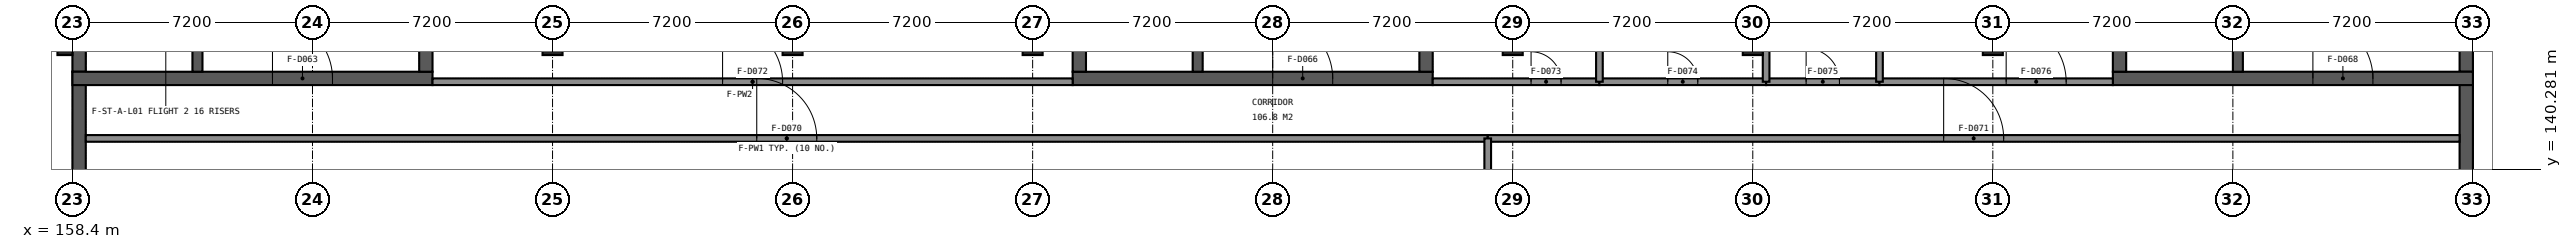
"""IFC4 building model, lengths in metres.
Left out: names, types, materials, properties, quantities, classifications, styles, units other than length and angle.
Written with IfcOpenShell. Run it as: python <this file> out.ifc"""

import sys

from ifc_helpers import new_model, si_unit, direction, frame, frame_2d, origin, origin_2d, place, context, subcontext, project, spatial, rectangle, extrude, element, fill, save


model = new_model("IFC4")
c1 = context("Model", 3, precision=1e-05, world=origin(), true_north=direction((0.0, 1.0)))
c2 = subcontext(c1, "Body", "Model", "MODEL_VIEW")
j1 = project(units=[si_unit("LENGTHUNIT", "METRE"), si_unit("PLANEANGLEUNIT", "RADIAN")], contexts=[c1])
p1 = place(None, origin())
s1 = spatial("IfcSite", under=j1, at=p1, CompositionType="ELEMENT")
p2 = place(p1, origin())
s2 = spatial("IfcBuilding", under=s1, at=p2, CompositionType="ELEMENT")
p3 = place(p2, frame((0.0, 0.0, 9.6)))
s3 = spatial("IfcBuildingStorey", under=s2, at=p3, CompositionType="ELEMENT", Elevation=9.6)
for number, where, z_axis, x_axis in (
    (1, (172.8, 144.0, 0.0), (0.0, 0.0, 1.0), (1.0, 0.0, 0.0)),
    (2, (180.0, 144.0, 0.0), (0.0, 0.0, 1.0), (1.0, 0.0, 0.0)),
    (3, (187.2, 144.0, 0.0), (0.0, 0.0, 1.0), (1.0, 0.0, 0.0)),
    (4, (201.6, 144.0, 0.0), (0.0, 0.0, 1.0), (1.0, 0.0, 0.0)),
    (5, (208.8, 144.0, 0.0), (0.0, 0.0, 1.0), (1.0, 0.0, 0.0)),
    (6, (216.0, 144.0, 0.0), (0.0, 0.0, 1.0), (1.0, 0.0, 0.0)),
):
    element("IfcColumn", number, at=place(p3, frame(where, z_axis=z_axis, x_axis=x_axis)), inside=s3, PredefinedType="COLUMN", context=c2, shape_type="SweptSolid", body=[
        extrude(rectangle(XDim=0.6, YDim=0.6, at=origin_2d()), origin(), (0.0, 0.0, 1.0), 4.8),
    ])
p4 = place(p3, frame((158.6, 137.1, 0.0), z_axis=(0.0, 0.0, 1.0), x_axis=(0.0, 1.0, 0.0)))
e7 = element("IfcWall", 7, at=p4, inside=s3, PredefinedType="SHEAR", context=c2, shape_type="SweptSolid", body=[
    extrude(rectangle(XDim=6.1, YDim=0.4, at=frame_2d((3.05, 0.0))), origin(), (0.0, 0.0, 1.0), 3.95),
])
p5 = place(p4, frame((0.85, 0.0, 0.8)))
e8 = element("IfcOpeningElement", 8, at=p5, cuts=e7, PredefinedType="OPENING", context=c2, shape_type="SweptSolid", body=[
    extrude(rectangle(XDim=1.6, YDim=3.1, at=frame_2d((0.8, 1.55))), frame((0.0, 0.21, 0.0), z_axis=(0.0, -1.0, 0.0), x_axis=(1.0, 0.0, 0.0)), (0.0, 0.0, 1.0), 0.42),
])
p6 = place(p3, frame((158.6, 143.2, 0.0), z_axis=(0.0, 0.0, 1.0), x_axis=(0.0, 1.0, 0.0)))
e9 = element("IfcWall", 9, at=p6, inside=s3, PredefinedType="SHEAR", context=c2, shape_type="SweptSolid", body=[
    extrude(rectangle(XDim=7.6, YDim=0.4, at=frame_2d((3.8, 0.0))), origin(), (0.0, 0.0, 1.0), 4.55),
])
p7 = place(p3, frame((230.2, 143.2, 0.0), z_axis=(0.0, 0.0, 1.0), x_axis=(0.0, -1.0, 0.0)))
e10 = element("IfcWall", 10, at=p7, inside=s3, PredefinedType="SHEAR", context=c2, shape_type="SweptSolid", body=[
    extrude(rectangle(XDim=6.1, YDim=0.4, at=frame_2d((3.05, 0.0))), origin(), (0.0, 0.0, 1.0), 3.95),
])
p8 = place(p7, frame((3.65, 0.0, 0.8)))
e11 = element("IfcOpeningElement", 11, at=p8, cuts=e10, PredefinedType="OPENING", context=c2, shape_type="SweptSolid", body=[
    extrude(rectangle(XDim=1.6, YDim=3.1, at=frame_2d((0.8, 1.55))), frame((0.0, 0.21, 0.0), z_axis=(0.0, -1.0, 0.0), x_axis=(1.0, 0.0, 0.0)), (0.0, 0.0, 1.0), 0.42),
])
p9 = place(p3, frame((230.2, 150.8, 0.0), z_axis=(0.0, 0.0, 1.0), x_axis=(0.0, -1.0, 0.0)))
e12 = element("IfcWall", 12, at=p9, inside=s3, PredefinedType="SHEAR", context=c2, shape_type="SweptSolid", body=[
    extrude(rectangle(XDim=7.6, YDim=0.4, at=frame_2d((3.8, 0.0))), origin(), (0.0, 0.0, 1.0), 4.55),
])
p10 = place(p3, frame((158.4, 143.0, 0.0), z_axis=(0.0, 0.0, 1.0), x_axis=(1.0, 0.0, 0.0)))
e13 = element("IfcWall", 13, at=p10, inside=s3, PredefinedType="SHEAR", context=c2, shape_type="SweptSolid", body=[
    extrude(rectangle(XDim=10.8, YDim=0.4, at=frame_2d((5.4, 0.0))), origin(), (0.0, 0.0, 1.0), 4.55),
])
p11 = place(p10, frame((6.0, 0.0, 0.0)))
e14 = element("IfcOpeningElement", 14, at=p11, cuts=e13, PredefinedType="OPENING", context=c2, shape_type="SweptSolid", body=[
    extrude(rectangle(XDim=1.8, YDim=2.1, at=frame_2d((0.9, 1.05))), frame((0.0, 0.21, 0.0), z_axis=(0.0, -1.0, 0.0), x_axis=(1.0, 0.0, 0.0)), (0.0, 0.0, 1.0), 0.42),
])
p12 = place(p3, frame((169.0, 143.2, 0.0), z_axis=(0.0, 0.0, 1.0), x_axis=(0.0, 1.0, 0.0)))
e15 = element("IfcWall", 15, at=p12, inside=s3, PredefinedType="SHEAR", context=c2, shape_type="SweptSolid", body=[
    extrude(rectangle(XDim=7.6, YDim=0.4, at=frame_2d((3.8, 0.0))), origin(), (0.0, 0.0, 1.0), 4.55),
])
p13 = place(p3, frame((162.15, 143.2, 0.0), z_axis=(0.0, 0.0, 1.0), x_axis=(0.0, 1.0, 0.0)))
e16 = element("IfcWall", 16, at=p13, inside=s3, PredefinedType="SHEAR", context=c2, shape_type="SweptSolid", body=[
    extrude(rectangle(XDim=7.6, YDim=0.3, at=frame_2d((3.8, 0.0))), origin(), (0.0, 0.0, 1.0), 4.55),
])
p14 = place(p13, frame((6.35, 0.0, 0.0)))
e17 = element("IfcOpeningElement", 17, at=p14, cuts=e16, PredefinedType="OPENING", context=c2, shape_type="SweptSolid", body=[
    extrude(rectangle(XDim=1.0, YDim=2.1, at=frame_2d((0.5, 1.05))), frame((0.0, 0.16, 0.0), z_axis=(0.0, -1.0, 0.0), x_axis=(1.0, 0.0, 0.0)), (0.0, 0.0, 1.0), 0.32),
])
p15 = place(p3, frame((188.4, 143.0, 0.0), z_axis=(0.0, 0.0, 1.0), x_axis=(1.0, 0.0, 0.0)))
e18 = element("IfcWall", 18, at=p15, inside=s3, PredefinedType="SHEAR", context=c2, shape_type="SweptSolid", body=[
    extrude(rectangle(XDim=10.8, YDim=0.4, at=frame_2d((5.4, 0.0))), origin(), (0.0, 0.0, 1.0), 4.55),
])
p16 = place(p15, frame((6.0, 0.0, 0.0)))
e19 = element("IfcOpeningElement", 19, at=p16, cuts=e18, PredefinedType="OPENING", context=c2, shape_type="SweptSolid", body=[
    extrude(rectangle(XDim=1.8, YDim=2.1, at=frame_2d((0.9, 1.05))), frame((0.0, 0.21, 0.0), z_axis=(0.0, -1.0, 0.0), x_axis=(1.0, 0.0, 0.0)), (0.0, 0.0, 1.0), 0.42),
])
for number, where, z_axis, x_axis in (
    (20, (188.6, 143.2, 0.0), (0.0, 0.0, 1.0), (0.0, 1.0, 0.0)),
    (21, (199.0, 143.2, 0.0), (0.0, 0.0, 1.0), (0.0, 1.0, 0.0)),
):
    element("IfcWall", number, at=place(p3, frame(where, z_axis=z_axis, x_axis=x_axis)), inside=s3, PredefinedType="SHEAR", context=c2, shape_type="SweptSolid", body=[
        extrude(rectangle(XDim=7.6, YDim=0.4, at=frame_2d((3.8, 0.0))), origin(), (0.0, 0.0, 1.0), 4.55),
    ])
p17 = place(p3, frame((192.15, 143.2, 0.0), z_axis=(0.0, 0.0, 1.0), x_axis=(0.0, 1.0, 0.0)))
e22 = element("IfcWall", 22, at=p17, inside=s3, PredefinedType="SHEAR", context=c2, shape_type="SweptSolid", body=[
    extrude(rectangle(XDim=7.6, YDim=0.3, at=frame_2d((3.8, 0.0))), origin(), (0.0, 0.0, 1.0), 4.55),
])
p18 = place(p17, frame((6.35, 0.0, 0.0)))
e23 = element("IfcOpeningElement", 23, at=p18, cuts=e22, PredefinedType="OPENING", context=c2, shape_type="SweptSolid", body=[
    extrude(rectangle(XDim=1.0, YDim=2.1, at=frame_2d((0.5, 1.05))), frame((0.0, 0.16, 0.0), z_axis=(0.0, -1.0, 0.0), x_axis=(1.0, 0.0, 0.0)), (0.0, 0.0, 1.0), 0.32),
])
p19 = place(p3, frame((219.6, 143.0, 0.0), z_axis=(0.0, 0.0, 1.0), x_axis=(1.0, 0.0, 0.0)))
e24 = element("IfcWall", 24, at=p19, inside=s3, PredefinedType="SHEAR", context=c2, shape_type="SweptSolid", body=[
    extrude(rectangle(XDim=10.8, YDim=0.4, at=frame_2d((5.4, 0.0))), origin(), (0.0, 0.0, 1.0), 4.55),
])
p20 = place(p19, frame((6.0, 0.0, 0.0)))
e25 = element("IfcOpeningElement", 25, at=p20, cuts=e24, PredefinedType="OPENING", context=c2, shape_type="SweptSolid", body=[
    extrude(rectangle(XDim=1.8, YDim=2.1, at=frame_2d((0.9, 1.05))), frame((0.0, 0.21, 0.0), z_axis=(0.0, -1.0, 0.0), x_axis=(1.0, 0.0, 0.0)), (0.0, 0.0, 1.0), 0.42),
])
p21 = place(p3, frame((219.8, 143.2, 0.0), z_axis=(0.0, 0.0, 1.0), x_axis=(0.0, 1.0, 0.0)))
e26 = element("IfcWall", 26, at=p21, inside=s3, PredefinedType="SHEAR", context=c2, shape_type="SweptSolid", body=[
    extrude(rectangle(XDim=7.6, YDim=0.4, at=frame_2d((3.8, 0.0))), origin(), (0.0, 0.0, 1.0), 4.55),
])
p22 = place(p3, frame((223.35, 143.2, 0.0), z_axis=(0.0, 0.0, 1.0), x_axis=(0.0, 1.0, 0.0)))
e27 = element("IfcWall", 27, at=p22, inside=s3, PredefinedType="SHEAR", context=c2, shape_type="SweptSolid", body=[
    extrude(rectangle(XDim=7.6, YDim=0.3, at=frame_2d((3.8, 0.0))), origin(), (0.0, 0.0, 1.0), 4.55),
])
p23 = place(p22, frame((6.35, 0.0, 0.0)))
e28 = element("IfcOpeningElement", 28, at=p23, cuts=e27, PredefinedType="OPENING", context=c2, shape_type="SweptSolid", body=[
    extrude(rectangle(XDim=1.0, YDim=2.1, at=frame_2d((0.5, 1.05))), frame((0.0, 0.16, 0.0), z_axis=(0.0, -1.0, 0.0), x_axis=(1.0, 0.0, 0.0)), (0.0, 0.0, 1.0), 0.32),
])
p24 = place(p3, frame((158.175, 144.0, 0.0), z_axis=(0.0, 0.0, 1.0), x_axis=(0.0, 1.0, 0.0)))
e29 = element("IfcColumn", 29, at=p24, inside=s3, PredefinedType="PILASTER", context=c2, shape_type="SweptSolid", body=[
    extrude(rectangle(XDim=0.6, YDim=0.45, at=origin_2d()), origin(), (0.0, 0.0, 1.0), 4.8),
])
p25 = place(p3, frame((158.8, 141.2, 0.0), z_axis=(0.0, 0.0, 1.0), x_axis=(1.0, 0.0, 0.0)))
e30 = element("IfcWall", 30, at=p25, inside=s3, PredefinedType="PARTITIONING", context=c2, shape_type="SweptSolid", body=[
    extrude(rectangle(XDim=42.05, YDim=0.2, at=frame_2d((21.025, 0.0))), origin(), (0.0, 0.0, 1.0), 3.95),
])
p26 = place(p25, frame((20.125, 0.0, 0.0)))
e31 = element("IfcOpeningElement", 31, at=p26, cuts=e30, PredefinedType="OPENING", context=c2, shape_type="SweptSolid", body=[
    extrude(rectangle(XDim=1.8, YDim=2.1, at=frame_2d((0.9, 1.05))), frame((0.0, 0.11, 0.0), z_axis=(0.0, -1.0, 0.0), x_axis=(1.0, 0.0, 0.0)), (0.0, 0.0, 1.0), 0.22),
])
p27 = place(p3, frame((200.85, 141.2, 0.0), z_axis=(0.0, 0.0, 1.0), x_axis=(1.0, 0.0, 0.0)))
e32 = element("IfcWall", 32, at=p27, inside=s3, PredefinedType="PARTITIONING", context=c2, shape_type="SweptSolid", body=[
    extrude(rectangle(XDim=29.15, YDim=0.2, at=frame_2d((14.575, 0.0))), origin(), (0.0, 0.0, 1.0), 3.95),
])
p28 = place(p27, frame((13.675, 0.0, 0.0)))
e33 = element("IfcOpeningElement", 33, at=p28, cuts=e32, PredefinedType="OPENING", context=c2, shape_type="SweptSolid", body=[
    extrude(rectangle(XDim=1.8, YDim=2.1, at=frame_2d((0.9, 1.05))), frame((0.0, 0.11, 0.0), z_axis=(0.0, -1.0, 0.0), x_axis=(1.0, 0.0, 0.0)), (0.0, 0.0, 1.0), 0.22),
])
p29 = place(p3, frame((169.2, 142.9, 0.0), z_axis=(0.0, 0.0, 1.0), x_axis=(1.0, 0.0, 0.0)))
e34 = element("IfcWall", 34, at=p29, inside=s3, PredefinedType="PARTITIONING", context=c2, shape_type="SweptSolid", body=[
    extrude(rectangle(XDim=19.2, YDim=0.2, at=frame_2d((9.6, 0.0))), origin(), (0.0, 0.0, 1.0), 3.95),
])
p30 = place(p29, frame((8.7, 0.0, 0.0)))
e35 = element("IfcOpeningElement", 35, at=p30, cuts=e34, PredefinedType="OPENING", context=c2, shape_type="SweptSolid", body=[
    extrude(rectangle(XDim=1.8, YDim=2.1, at=frame_2d((0.9, 1.05))), frame((0.0, 0.11, 0.0), z_axis=(0.0, -1.0, 0.0), x_axis=(1.0, 0.0, 0.0)), (0.0, 0.0, 1.0), 0.22),
])
p31 = place(p3, frame((199.2, 142.9, 0.0), z_axis=(0.0, 0.0, 1.0), x_axis=(1.0, 0.0, 0.0)))
e36 = element("IfcWall", 36, at=p31, inside=s3, PredefinedType="PARTITIONING", context=c2, shape_type="SweptSolid", body=[
    extrude(rectangle(XDim=5.0, YDim=0.2, at=frame_2d((2.5, 0.0))), origin(), (0.0, 0.0, 1.0), 3.95),
])
p32 = place(p31, frame((2.95, 0.0, 0.0)))
e37 = element("IfcOpeningElement", 37, at=p32, cuts=e36, PredefinedType="OPENING", context=c2, shape_type="SweptSolid", body=[
    extrude(rectangle(XDim=0.9, YDim=2.1, at=frame_2d((0.45, 1.05))), frame((0.0, 0.11, 0.0), z_axis=(0.0, -1.0, 0.0), x_axis=(1.0, 0.0, 0.0)), (0.0, 0.0, 1.0), 0.22),
])
p33 = place(p3, frame((204.2, 142.9, 0.0), z_axis=(0.0, 0.0, 1.0), x_axis=(1.0, 0.0, 0.0)))
e38 = element("IfcWall", 38, at=p33, inside=s3, PredefinedType="PARTITIONING", context=c2, shape_type="SweptSolid", body=[
    extrude(rectangle(XDim=5.0, YDim=0.2, at=frame_2d((2.5, 0.0))), origin(), (0.0, 0.0, 1.0), 3.95),
])
p34 = place(p33, frame((2.05, 0.0, 0.0)))
e39 = element("IfcOpeningElement", 39, at=p34, cuts=e38, PredefinedType="OPENING", context=c2, shape_type="SweptSolid", body=[
    extrude(rectangle(XDim=0.9, YDim=2.1, at=frame_2d((0.45, 1.05))), frame((0.0, 0.11, 0.0), z_axis=(0.0, -1.0, 0.0), x_axis=(1.0, 0.0, 0.0)), (0.0, 0.0, 1.0), 0.22),
])
p35 = place(p3, frame((209.2, 142.9, 0.0), z_axis=(0.0, 0.0, 1.0), x_axis=(1.0, 0.0, 0.0)))
e40 = element("IfcWall", 40, at=p35, inside=s3, PredefinedType="PARTITIONING", context=c2, shape_type="SweptSolid", body=[
    extrude(rectangle(XDim=3.4, YDim=0.2, at=frame_2d((1.7, 0.0))), origin(), (0.0, 0.0, 1.0), 3.95),
])
p36 = place(p35, frame((1.2, 0.0, 0.0)))
e41 = element("IfcOpeningElement", 41, at=p36, cuts=e40, PredefinedType="OPENING", context=c2, shape_type="SweptSolid", body=[
    extrude(rectangle(XDim=1.0, YDim=2.1, at=frame_2d((0.5, 1.05))), frame((0.0, 0.11, 0.0), z_axis=(0.0, -1.0, 0.0), x_axis=(1.0, 0.0, 0.0)), (0.0, 0.0, 1.0), 0.22),
])
p37 = place(p3, frame((212.6, 142.9, 0.0), z_axis=(0.0, 0.0, 1.0), x_axis=(1.0, 0.0, 0.0)))
e42 = element("IfcWall", 42, at=p37, inside=s3, PredefinedType="PARTITIONING", context=c2, shape_type="SweptSolid", body=[
    extrude(rectangle(XDim=7.0, YDim=0.2, at=frame_2d((3.5, 0.0))), origin(), (0.0, 0.0, 1.0), 3.95),
])
p38 = place(p37, frame((3.8, 0.0, 0.0)))
e43 = element("IfcOpeningElement", 43, at=p38, cuts=e42, PredefinedType="OPENING", context=c2, shape_type="SweptSolid", body=[
    extrude(rectangle(XDim=1.8, YDim=2.1, at=frame_2d((0.9, 1.05))), frame((0.0, 0.11, 0.0), z_axis=(0.0, -1.0, 0.0), x_axis=(1.0, 0.0, 0.0)), (0.0, 0.0, 1.0), 0.22),
])
p39 = place(p3, frame((200.85, 130.0, 0.0), z_axis=(0.0, 0.0, 1.0), x_axis=(0.0, 1.0, 0.0)))
e44 = element("IfcWall", 44, at=p39, inside=s3, PredefinedType="PARTITIONING", context=c2, shape_type="SweptSolid", body=[
    extrude(rectangle(XDim=11.2, YDim=0.2, at=frame_2d((5.6, 0.0))), origin(), (0.0, 0.0, 1.0), 3.95),
])
for number, where, z_axis, x_axis in (
    (45, (204.2, 142.9, 0.0), (0.0, 0.0, 1.0), (0.0, 1.0, 0.0)),
    (46, (209.2, 142.9, 0.0), (0.0, 0.0, 1.0), (0.0, 1.0, 0.0)),
    (47, (212.6, 142.9, 0.0), (0.0, 0.0, 1.0), (0.0, 1.0, 0.0)),
):
    element("IfcWall", number, at=place(p3, frame(where, z_axis=z_axis, x_axis=x_axis)), inside=s3, PredefinedType="PARTITIONING", context=c2, shape_type="SweptSolid", body=[
        extrude(rectangle(XDim=7.9, YDim=0.2, at=frame_2d((3.95, 0.0))), origin(), (0.0, 0.0, 1.0), 3.95),
    ])
p40 = place(p11, origin())
e48 = element("IfcDoor", 48, at=p40, inside=s3, OperationType="NOTDEFINED", PredefinedType="DOOR", context=c2, shape_type="SweptSolid", body=[
    extrude(rectangle(XDim=1.8, YDim=2.1, at=frame_2d((0.9, 1.05))), frame((0.0, 0.025, 0.0), z_axis=(0.0, -1.0, 0.0), x_axis=(1.0, 0.0, 0.0)), (0.0, 0.0, 1.0), 0.05),
])
fill(e14, e48)
p41 = place(p16, origin())
e49 = element("IfcDoor", 49, at=p41, inside=s3, OperationType="NOTDEFINED", PredefinedType="DOOR", context=c2, shape_type="SweptSolid", body=[
    extrude(rectangle(XDim=1.8, YDim=2.1, at=frame_2d((0.9, 1.05))), frame((0.0, 0.025, 0.0), z_axis=(0.0, -1.0, 0.0), x_axis=(1.0, 0.0, 0.0)), (0.0, 0.0, 1.0), 0.05),
])
fill(e19, e49)
p42 = place(p20, origin())
e50 = element("IfcDoor", 50, at=p42, inside=s3, OperationType="NOTDEFINED", PredefinedType="DOOR", context=c2, shape_type="SweptSolid", body=[
    extrude(rectangle(XDim=1.8, YDim=2.1, at=frame_2d((0.9, 1.05))), frame((0.0, 0.025, 0.0), z_axis=(0.0, -1.0, 0.0), x_axis=(1.0, 0.0, 0.0)), (0.0, 0.0, 1.0), 0.05),
])
fill(e25, e50)
p43 = place(p26, origin())
e51 = element("IfcDoor", 51, at=p43, inside=s3, OperationType="NOTDEFINED", PredefinedType="DOOR", context=c2, shape_type="SweptSolid", body=[
    extrude(rectangle(XDim=1.8, YDim=2.1, at=frame_2d((0.9, 1.05))), frame((0.0, 0.025, 0.0), z_axis=(0.0, -1.0, 0.0), x_axis=(1.0, 0.0, 0.0)), (0.0, 0.0, 1.0), 0.05),
])
fill(e31, e51)
p44 = place(p28, origin())
e52 = element("IfcDoor", 52, at=p44, inside=s3, OperationType="NOTDEFINED", PredefinedType="DOOR", context=c2, shape_type="SweptSolid", body=[
    extrude(rectangle(XDim=1.8, YDim=2.1, at=frame_2d((0.9, 1.05))), frame((0.0, 0.025, 0.0), z_axis=(0.0, -1.0, 0.0), x_axis=(1.0, 0.0, 0.0)), (0.0, 0.0, 1.0), 0.05),
])
fill(e33, e52)
p45 = place(p30, origin())
e53 = element("IfcDoor", 53, at=p45, inside=s3, OperationType="NOTDEFINED", PredefinedType="DOOR", context=c2, shape_type="SweptSolid", body=[
    extrude(rectangle(XDim=1.8, YDim=2.1, at=frame_2d((0.9, 1.05))), frame((0.0, 0.025, 0.0), z_axis=(0.0, -1.0, 0.0), x_axis=(1.0, 0.0, 0.0)), (0.0, 0.0, 1.0), 0.05),
])
fill(e35, e53)
p46 = place(p32, origin())
e54 = element("IfcDoor", 54, at=p46, inside=s3, OperationType="NOTDEFINED", PredefinedType="DOOR", context=c2, shape_type="SweptSolid", body=[
    extrude(rectangle(XDim=0.9, YDim=2.1, at=frame_2d((0.45, 1.05))), frame((0.0, 0.025, 0.0), z_axis=(0.0, -1.0, 0.0), x_axis=(1.0, 0.0, 0.0)), (0.0, 0.0, 1.0), 0.05),
])
fill(e37, e54)
p47 = place(p34, origin())
e55 = element("IfcDoor", 55, at=p47, inside=s3, OperationType="NOTDEFINED", PredefinedType="DOOR", context=c2, shape_type="SweptSolid", body=[
    extrude(rectangle(XDim=0.9, YDim=2.1, at=frame_2d((0.45, 1.05))), frame((0.0, 0.025, 0.0), z_axis=(0.0, -1.0, 0.0), x_axis=(1.0, 0.0, 0.0)), (0.0, 0.0, 1.0), 0.05),
])
fill(e39, e55)
p48 = place(p36, origin())
e56 = element("IfcDoor", 56, at=p48, inside=s3, OperationType="NOTDEFINED", PredefinedType="DOOR", context=c2, shape_type="SweptSolid", body=[
    extrude(rectangle(XDim=1.0, YDim=2.1, at=frame_2d((0.5, 1.05))), frame((0.0, 0.025, 0.0), z_axis=(0.0, -1.0, 0.0), x_axis=(1.0, 0.0, 0.0)), (0.0, 0.0, 1.0), 0.05),
])
fill(e41, e56)
p49 = place(p38, origin())
e57 = element("IfcDoor", 57, at=p49, inside=s3, OperationType="NOTDEFINED", PredefinedType="DOOR", context=c2, shape_type="SweptSolid", body=[
    extrude(rectangle(XDim=1.8, YDim=2.1, at=frame_2d((0.9, 1.05))), frame((0.0, 0.025, 0.0), z_axis=(0.0, -1.0, 0.0), x_axis=(1.0, 0.0, 0.0)), (0.0, 0.0, 1.0), 0.05),
])
fill(e43, e57)
save(model, sys.argv[1])
